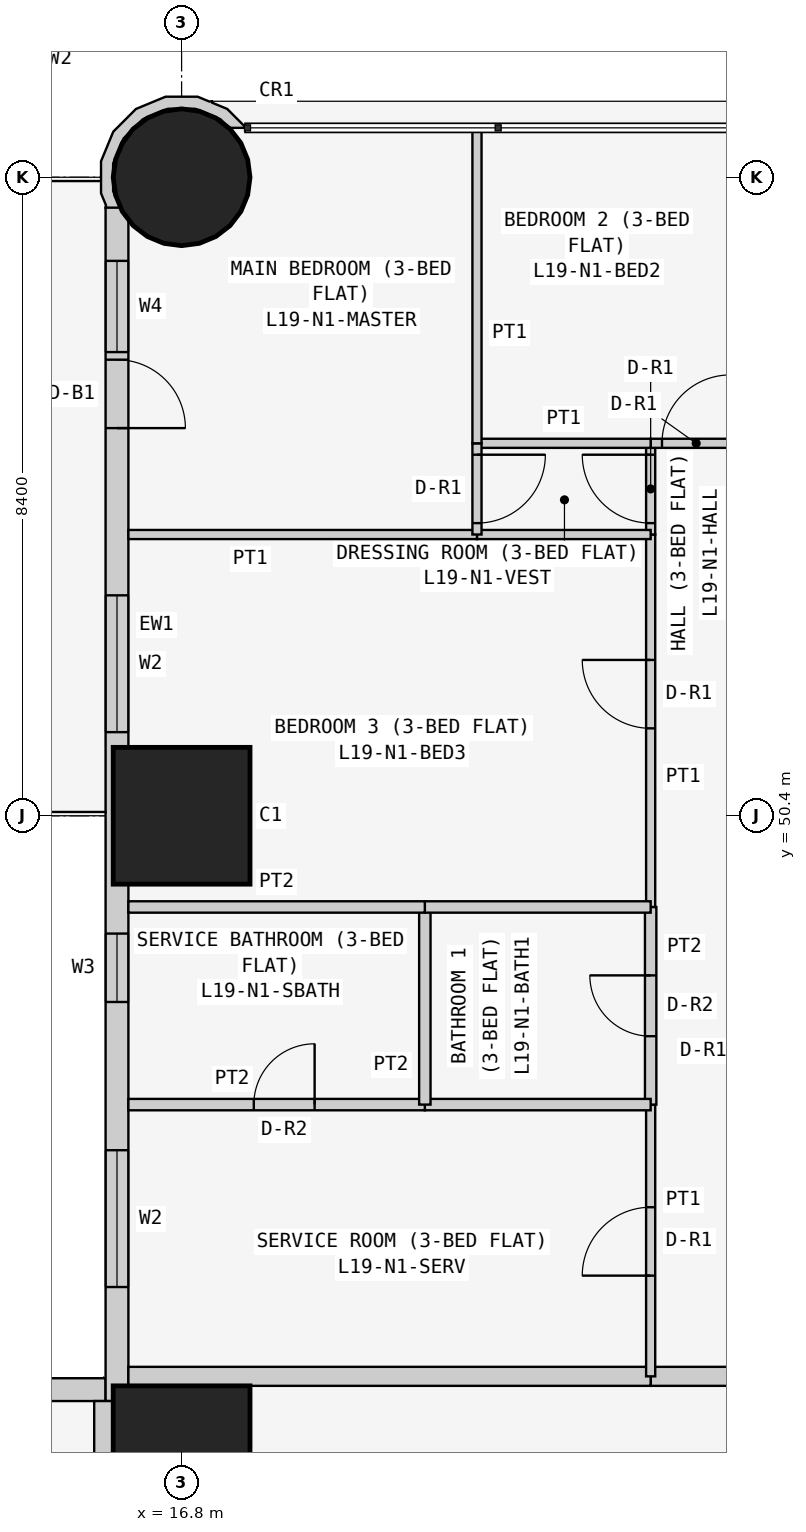
"""IFC4 building model, lengths in metres.
Left out: names, types, materials, properties, quantities, classifications, styles, units other than length and angle.
Written with IfcOpenShell. Run it as: python <this file> out.ifc"""

import sys

from ifc_helpers import new_model, si_unit, direction, frame, frame_2d, origin, origin_2d, place, context, subcontext, project, spatial, polyline, rectangle, circle, outline, extrude, element, fill, save


model = new_model("IFC4")
c1 = context("Model", 3, precision=1e-05, world=origin(), true_north=direction((0.0, 1.0)))
c2 = subcontext(c1, "Body", "Model", "MODEL_VIEW")
j1 = project(units=[si_unit("LENGTHUNIT", "METRE"), si_unit("PLANEANGLEUNIT", "RADIAN")], contexts=[c1])
p1 = place(None, origin())
s1 = spatial("IfcSite", under=j1, at=p1, CompositionType="ELEMENT")
p2 = place(p1, origin())
s2 = spatial("IfcBuilding", under=s1, at=p2, CompositionType="ELEMENT")
p3 = place(p2, frame((0.0, 0.0, 77.7)))
s3 = spatial("IfcBuildingStorey", under=s2, at=p3, CompositionType="ELEMENT", Elevation=77.7)
for number, where, z_axis, x_axis in (
    (1, (16.8, 42.0, 0.0), (0.0, 0.0, 1.0), (1.0, 0.0, 0.0)),
    (2, (16.8, 50.4, 0.0), (0.0, 0.0, 1.0), (1.0, 0.0, 0.0)),
):
    element("IfcColumn", number, at=place(p3, frame(where, z_axis=z_axis, x_axis=x_axis)), inside=s3, PredefinedType="COLUMN", context=c2, shape_type="SweptSolid", body=[
        extrude(rectangle(XDim=1.8, YDim=1.8, at=origin_2d()), origin(), (0.0, 0.0, 1.0), 3.6),
    ])
p4 = place(p3, frame((16.8, 58.8, 0.0), z_axis=(0.0, 0.0, 1.0), x_axis=(1.0, 0.0, 0.0)))
e3 = element("IfcColumn", 3, at=p4, inside=s3, PredefinedType="COLUMN", context=c2, shape_type="SweptSolid", body=[
    extrude(circle(Radius=0.9, at=origin_2d()), origin(), (0.0, 0.0, 1.0), 3.6),
])
p5 = place(p3, frame((15.8, 42.85, 0.0), z_axis=(0.0, 0.0, 1.0), x_axis=(-1.0, 0.0, 0.0)))
e4 = element("IfcWall", 4, at=p5, inside=s3, PredefinedType="SOLIDWALL", context=c2, shape_type="SweptSolid", body=[
    extrude(rectangle(XDim=15.4, YDim=0.3, at=frame_2d((7.7, 0.0))), origin(), (0.0, 0.0, 1.0), 3.45),
])
p6 = place(p5, frame((1.2, 0.0, 0.9)))
e5 = element("IfcOpeningElement", 5, at=p6, cuts=e4, PredefinedType="OPENING", context=c2, shape_type="SweptSolid", body=[
    extrude(rectangle(XDim=1.8, YDim=1.5, at=frame_2d((0.9, 0.75))), frame((0.0, 0.16, 0.0), z_axis=(0.0, -1.0, 0.0), x_axis=(1.0, 0.0, 0.0)), (0.0, 0.0, 1.0), 0.32),
])
p7 = place(p5, frame((4.95, 0.0, 1.5)))
e6 = element("IfcOpeningElement", 6, at=p7, cuts=e4, PredefinedType="OPENING", context=c2, shape_type="SweptSolid", body=[
    extrude(rectangle(XDim=0.9, YDim=0.7, at=frame_2d((0.45, 0.35))), frame((0.0, 0.16, 0.0), z_axis=(0.0, -1.0, 0.0), x_axis=(1.0, 0.0, 0.0)), (0.0, 0.0, 1.0), 0.32),
])
p8 = place(p5, frame((8.5, 0.0, 0.9)))
e7 = element("IfcOpeningElement", 7, at=p8, cuts=e4, PredefinedType="OPENING", context=c2, shape_type="SweptSolid", body=[
    extrude(rectangle(XDim=1.8, YDim=1.5, at=frame_2d((0.9, 0.75))), frame((0.0, 0.16, 0.0), z_axis=(0.0, -1.0, 0.0), x_axis=(1.0, 0.0, 0.0)), (0.0, 0.0, 1.0), 0.32),
])
p9 = place(p5, frame((12.5, 0.0, 0.0)))
e8 = element("IfcOpeningElement", 8, at=p9, cuts=e4, PredefinedType="OPENING", context=c2, shape_type="SweptSolid", body=[
    extrude(rectangle(XDim=0.9, YDim=2.4, at=frame_2d((0.45, 1.2))), frame((0.0, 0.16, 0.0), z_axis=(0.0, -1.0, 0.0), x_axis=(1.0, 0.0, 0.0)), (0.0, 0.0, 1.0), 0.32),
])
p10 = place(p5, frame((13.5, 0.0, 0.9)))
e9 = element("IfcOpeningElement", 9, at=p10, cuts=e4, PredefinedType="OPENING", context=c2, shape_type="SweptSolid", body=[
    extrude(rectangle(XDim=1.2, YDim=1.5, at=frame_2d((0.6, 0.75))), frame((0.0, 0.16, 0.0), z_axis=(0.0, -1.0, 0.0), x_axis=(1.0, 0.0, 0.0)), (0.0, 0.0, 1.0), 0.32),
])
p11 = place(p3, frame((15.95, 58.4, 0.0), z_axis=(0.0, 0.0, 1.0), x_axis=(0.0, -1.0, 0.0)))
e10 = element("IfcWall", 10, at=p11, inside=s3, PredefinedType="SOLIDWALL", context=c2, shape_type="SweptSolid", body=[
    extrude(rectangle(XDim=15.7, YDim=0.3, at=frame_2d((7.85, 0.0))), origin(), (0.0, 0.0, 1.0), 3.45),
])
p12 = place(p11, frame((12.4, 0.0, 0.9)))
e11 = element("IfcOpeningElement", 11, at=p12, cuts=e10, PredefinedType="OPENING", context=c2, shape_type="SweptSolid", body=[
    extrude(rectangle(XDim=1.8, YDim=1.5, at=frame_2d((0.9, 0.75))), frame((0.0, 0.16, 0.0), z_axis=(0.0, -1.0, 0.0), x_axis=(1.0, 0.0, 0.0)), (0.0, 0.0, 1.0), 0.32),
])
p13 = place(p11, frame((9.55, 0.0, 1.5)))
e12 = element("IfcOpeningElement", 12, at=p13, cuts=e10, PredefinedType="OPENING", context=c2, shape_type="SweptSolid", body=[
    extrude(rectangle(XDim=0.9, YDim=0.7, at=frame_2d((0.45, 0.35))), frame((0.0, 0.16, 0.0), z_axis=(0.0, -1.0, 0.0), x_axis=(1.0, 0.0, 0.0)), (0.0, 0.0, 1.0), 0.32),
])
p14 = place(p11, frame((5.1, 0.0, 0.9)))
e13 = element("IfcOpeningElement", 13, at=p14, cuts=e10, PredefinedType="OPENING", context=c2, shape_type="SweptSolid", body=[
    extrude(rectangle(XDim=1.8, YDim=1.5, at=frame_2d((0.9, 0.75))), frame((0.0, 0.16, 0.0), z_axis=(0.0, -1.0, 0.0), x_axis=(1.0, 0.0, 0.0)), (0.0, 0.0, 1.0), 0.32),
])
p15 = place(p11, frame((2.0, 0.0, 0.0)))
e14 = element("IfcOpeningElement", 14, at=p15, cuts=e10, PredefinedType="OPENING", context=c2, shape_type="SweptSolid", body=[
    extrude(rectangle(XDim=0.9, YDim=2.4, at=frame_2d((0.45, 1.2))), frame((0.0, 0.16, 0.0), z_axis=(0.0, -1.0, 0.0), x_axis=(1.0, 0.0, 0.0)), (0.0, 0.0, 1.0), 0.32),
])
p16 = place(p11, frame((0.7, 0.0, 0.9)))
e15 = element("IfcOpeningElement", 15, at=p16, cuts=e10, PredefinedType="OPENING", context=c2, shape_type="SweptSolid", body=[
    extrude(rectangle(XDim=1.2, YDim=1.5, at=frame_2d((0.6, 0.75))), frame((0.0, 0.16, 0.0), z_axis=(0.0, -1.0, 0.0), x_axis=(1.0, 0.0, 0.0)), (0.0, 0.0, 1.0), 0.32),
])
p17 = place(p3, frame((17.567, 59.411, 0.0), z_axis=(0.0, 0.0, 1.0), x_axis=(-0.377204953059, 0.926129809145, 0.0)))
e16 = element("IfcWall", 16, at=p17, inside=s3, PredefinedType="SOLIDWALL", context=c2, shape_type="SweptSolid", body=[
    extrude(outline(polyline([(-0.27, 2.017), (-0.37, 1.841), (-0.102, 1.842), (0.23, 1.707), (0.484, 1.455), (0.624, 1.125), (0.626, 0.766), (0.491, 0.434), (0.239, 0.18), (0.09, 0.117), (0.011, -0.078), (0.024, -0.083), (0.329, 0.045), (0.48, 0.198), (0.499, 0.193), (0.508, 0.225), (0.626, 0.345), (0.785, 0.736), (0.782, 1.157), (0.619, 1.546), (0.319, 1.842), (-0.072, 2.002), (-0.24, 2.0), (-0.27, 2.017)])), origin(), (0.0, 0.0, 1.0), 3.45),
])
p18 = place(p3, frame((22.971, 43.025, 0.0), z_axis=(0.0, 0.0, 1.0), x_axis=(1.0, 0.0, 0.0)))
e17 = element("IfcWall", 17, at=p18, inside=s3, PredefinedType="PARTITIONING", context=c2, shape_type="SweptSolid", body=[
    extrude(rectangle(XDim=1.2, YDim=0.25, at=frame_2d((0.6, 0.0))), origin(), (0.0, 0.0, 1.0), 3.45),
])
p19 = place(p3, frame((16.1, 43.025, 0.0), z_axis=(0.0, 0.0, 1.0), x_axis=(1.0, 0.0, 0.0)))
e18 = element("IfcWall", 18, at=p19, inside=s3, PredefinedType="PARTITIONING", context=c2, shape_type="SweptSolid", body=[
    extrude(rectangle(XDim=6.871, YDim=0.25, at=frame_2d((3.436, 0.0))), origin(), (0.0, 0.0, 1.0), 3.45),
])
p20 = place(p3, frame((15.775, 36.229, 0.0), z_axis=(0.0, 0.0, 1.0), x_axis=(0.0, 1.0, 0.0)))
e19 = element("IfcWall", 19, at=p20, inside=s3, PredefinedType="PARTITIONING", context=c2, shape_type="SweptSolid", body=[
    extrude(rectangle(XDim=6.471, YDim=0.25, at=frame_2d((3.235, 0.0))), origin(), (0.0, 0.0, 1.0), 3.45),
])
p21 = place(p3, frame((22.971, 46.6, 0.0), z_axis=(0.0, 0.0, 1.0), x_axis=(0.0, -1.0, 0.0)))
e20 = element("IfcWall", 20, at=p21, inside=s3, PredefinedType="PARTITIONING", context=c2, shape_type="SweptSolid", body=[
    extrude(rectangle(XDim=3.575, YDim=0.12, at=frame_2d((1.788, 0.0))), origin(), (0.0, 0.0, 1.0), 3.45),
])
p22 = place(p21, frame((1.35, 0.0, 0.0)))
e21 = element("IfcOpeningElement", 21, at=p22, cuts=e20, PredefinedType="OPENING", context=c2, shape_type="SweptSolid", body=[
    extrude(rectangle(XDim=0.9, YDim=2.1, at=frame_2d((0.45, 1.05))), frame((0.0, 0.07, 0.0), z_axis=(0.0, -1.0, 0.0), x_axis=(1.0, 0.0, 0.0)), (0.0, 0.0, 1.0), 0.14),
])
p23 = place(p3, frame((22.971, 49.2, 0.0), z_axis=(0.0, 0.0, 1.0), x_axis=(0.0, -1.0, 0.0)))
e22 = element("IfcWall", 22, at=p23, inside=s3, PredefinedType="PARTITIONING", context=c2, shape_type="SweptSolid", body=[
    extrude(rectangle(XDim=2.6, YDim=0.15, at=frame_2d((1.3, 0.0))), origin(), (0.0, 0.0, 1.0), 3.45),
])
p24 = place(p23, frame((0.9, 0.0, 0.0)))
e23 = element("IfcOpeningElement", 23, at=p24, cuts=e22, PredefinedType="OPENING", context=c2, shape_type="SweptSolid", body=[
    extrude(rectangle(XDim=0.8, YDim=2.1, at=frame_2d((0.4, 1.05))), frame((0.0, 0.085, 0.0), z_axis=(0.0, -1.0, 0.0), x_axis=(1.0, 0.0, 0.0)), (0.0, 0.0, 1.0), 0.17),
])
p25 = place(p3, frame((22.971, 54.1, 0.0), z_axis=(0.0, 0.0, 1.0), x_axis=(0.0, -1.0, 0.0)))
e24 = element("IfcWall", 24, at=p25, inside=s3, PredefinedType="PARTITIONING", context=c2, shape_type="SweptSolid", body=[
    extrude(rectangle(XDim=4.9, YDim=0.12, at=frame_2d((2.45, 0.0))), origin(), (0.0, 0.0, 1.0), 3.45),
])
p26 = place(p25, frame((1.65, 0.0, 0.0)))
e25 = element("IfcOpeningElement", 25, at=p26, cuts=e24, PredefinedType="OPENING", context=c2, shape_type="SweptSolid", body=[
    extrude(rectangle(XDim=0.9, YDim=2.1, at=frame_2d((0.45, 1.05))), frame((0.0, 0.07, 0.0), z_axis=(0.0, -1.0, 0.0), x_axis=(1.0, 0.0, 0.0)), (0.0, 0.0, 1.0), 0.14),
])
p27 = place(p3, frame((22.971, 55.3, 0.0), z_axis=(0.0, 0.0, 1.0), x_axis=(0.0, -1.0, 0.0)))
e26 = element("IfcWall", 26, at=p27, inside=s3, PredefinedType="PARTITIONING", context=c2, shape_type="SweptSolid", body=[
    extrude(rectangle(XDim=1.2, YDim=0.12, at=frame_2d((0.6, 0.0))), origin(), (0.0, 0.0, 1.0), 3.45),
])
p28 = place(p27, frame((0.15, 0.0, 0.0)))
e27 = element("IfcOpeningElement", 27, at=p28, cuts=e26, PredefinedType="OPENING", context=c2, shape_type="SweptSolid", body=[
    extrude(rectangle(XDim=0.9, YDim=2.1, at=frame_2d((0.45, 1.05))), frame((0.0, 0.07, 0.0), z_axis=(0.0, -1.0, 0.0), x_axis=(1.0, 0.0, 0.0)), (0.0, 0.0, 1.0), 0.14),
])
p29 = place(p3, frame((24.171, 55.3, 0.0), z_axis=(0.0, 0.0, 1.0), x_axis=(-1.0, 0.0, 0.0)))
e28 = element("IfcWall", 28, at=p29, inside=s3, PredefinedType="PARTITIONING", context=c2, shape_type="SweptSolid", body=[
    extrude(rectangle(XDim=1.2, YDim=0.12, at=frame_2d((0.6, 0.0))), origin(), (0.0, 0.0, 1.0), 3.45),
])
p30 = place(p29, frame((0.151, 0.0, 0.0)))
e29 = element("IfcOpeningElement", 29, at=p30, cuts=e28, PredefinedType="OPENING", context=c2, shape_type="SweptSolid", body=[
    extrude(rectangle(XDim=0.9, YDim=2.1, at=frame_2d((0.45, 1.05))), frame((0.0, 0.07, 0.0), z_axis=(0.0, -1.0, 0.0), x_axis=(1.0, 0.0, 0.0)), (0.0, 0.0, 1.0), 0.14),
])
p31 = place(p3, frame((22.971, 46.6, 0.0), z_axis=(0.0, 0.0, 1.0), x_axis=(-1.0, 0.0, 0.0)))
e30 = element("IfcWall", 30, at=p31, inside=s3, PredefinedType="PARTITIONING", context=c2, shape_type="SweptSolid", body=[
    extrude(rectangle(XDim=2.971, YDim=0.15, at=frame_2d((1.485, 0.0))), origin(), (0.0, 0.0, 1.0), 3.45),
])
p32 = place(p3, frame((20.0, 46.6, 0.0), z_axis=(0.0, 0.0, 1.0), x_axis=(-1.0, 0.0, 0.0)))
e31 = element("IfcWall", 31, at=p32, inside=s3, PredefinedType="PARTITIONING", context=c2, shape_type="SweptSolid", body=[
    extrude(rectangle(XDim=3.9, YDim=0.15, at=frame_2d((1.95, 0.0))), origin(), (0.0, 0.0, 1.0), 3.45),
])
p33 = place(p32, frame((1.45, 0.0, 0.0)))
e32 = element("IfcOpeningElement", 32, at=p33, cuts=e31, PredefinedType="OPENING", context=c2, shape_type="SweptSolid", body=[
    extrude(rectangle(XDim=0.8, YDim=2.1, at=frame_2d((0.4, 1.05))), frame((0.0, 0.085, 0.0), z_axis=(0.0, -1.0, 0.0), x_axis=(1.0, 0.0, 0.0)), (0.0, 0.0, 1.0), 0.17),
])
p34 = place(p3, frame((20.0, 49.2, 0.0), z_axis=(0.0, 0.0, 1.0), x_axis=(0.0, -1.0, 0.0)))
e33 = element("IfcWall", 33, at=p34, inside=s3, PredefinedType="PARTITIONING", context=c2, shape_type="SweptSolid", body=[
    extrude(rectangle(XDim=2.6, YDim=0.15, at=frame_2d((1.3, 0.0))), origin(), (0.0, 0.0, 1.0), 3.45),
])
p35 = place(p3, frame((22.971, 49.2, 0.0), z_axis=(0.0, 0.0, 1.0), x_axis=(-1.0, 0.0, 0.0)))
e34 = element("IfcWall", 34, at=p35, inside=s3, PredefinedType="PARTITIONING", context=c2, shape_type="SweptSolid", body=[
    extrude(rectangle(XDim=2.971, YDim=0.15, at=frame_2d((1.485, 0.0))), origin(), (0.0, 0.0, 1.0), 3.45),
])
p36 = place(p3, frame((20.0, 49.2, 0.0), z_axis=(0.0, 0.0, 1.0), x_axis=(-1.0, 0.0, 0.0)))
e35 = element("IfcWall", 35, at=p36, inside=s3, PredefinedType="PARTITIONING", context=c2, shape_type="SweptSolid", body=[
    extrude(rectangle(XDim=3.9, YDim=0.15, at=frame_2d((1.95, 0.0))), origin(), (0.0, 0.0, 1.0), 3.45),
])
p37 = place(p3, frame((22.971, 54.1, 0.0), z_axis=(0.0, 0.0, 1.0), x_axis=(-1.0, 0.0, 0.0)))
e36 = element("IfcWall", 36, at=p37, inside=s3, PredefinedType="PARTITIONING", context=c2, shape_type="SweptSolid", body=[
    extrude(rectangle(XDim=2.285, YDim=0.12, at=frame_2d((1.143, 0.0))), origin(), (0.0, 0.0, 1.0), 3.45),
])
p38 = place(p3, frame((20.686, 54.1, 0.0), z_axis=(0.0, 0.0, 1.0), x_axis=(-1.0, 0.0, 0.0)))
e37 = element("IfcWall", 37, at=p38, inside=s3, PredefinedType="PARTITIONING", context=c2, shape_type="SweptSolid", body=[
    extrude(rectangle(XDim=4.586, YDim=0.12, at=frame_2d((2.293, 0.0))), origin(), (0.0, 0.0, 1.0), 3.45),
])
p39 = place(p3, frame((22.971, 55.3, 0.0), z_axis=(0.0, 0.0, 1.0), x_axis=(-1.0, 0.0, 0.0)))
e38 = element("IfcWall", 38, at=p39, inside=s3, PredefinedType="PARTITIONING", context=c2, shape_type="SweptSolid", body=[
    extrude(rectangle(XDim=2.285, YDim=0.12, at=frame_2d((1.143, 0.0))), origin(), (0.0, 0.0, 1.0), 3.45),
])
p40 = place(p3, frame((20.686, 55.3, 0.0), z_axis=(0.0, 0.0, 1.0), x_axis=(0.0, -1.0, 0.0)))
e39 = element("IfcWall", 39, at=p40, inside=s3, PredefinedType="PARTITIONING", context=c2, shape_type="SweptSolid", body=[
    extrude(rectangle(XDim=1.2, YDim=0.12, at=frame_2d((0.6, 0.0))), origin(), (0.0, 0.0, 1.0), 3.45),
])
p41 = place(p40, frame((0.15, 0.0, 0.0)))
e40 = element("IfcOpeningElement", 40, at=p41, cuts=e39, PredefinedType="OPENING", context=c2, shape_type="SweptSolid", body=[
    extrude(rectangle(XDim=0.9, YDim=2.1, at=frame_2d((0.45, 1.05))), frame((0.0, 0.07, 0.0), z_axis=(0.0, -1.0, 0.0), x_axis=(1.0, 0.0, 0.0)), (0.0, 0.0, 1.0), 0.14),
])
p42 = place(p3, frame((20.686, 59.45, 0.0), z_axis=(0.0, 0.0, 1.0), x_axis=(0.0, -1.0, 0.0)))
e41 = element("IfcWall", 41, at=p42, inside=s3, PredefinedType="PARTITIONING", context=c2, shape_type="SweptSolid", body=[
    extrude(rectangle(XDim=4.15, YDim=0.12, at=frame_2d((2.075, 0.0))), origin(), (0.0, 0.0, 1.0), 3.45),
])
p43 = place(p12, origin())
e42 = element("IfcWindow", 42, at=p43, inside=s3, PartitioningType="SINGLE_PANEL", PredefinedType="WINDOW", context=c2, shape_type="SweptSolid", body=[
    extrude(rectangle(XDim=1.8, YDim=1.5, at=frame_2d((0.9, 0.75))), frame((0.0, 0.03, 0.0), z_axis=(0.0, -1.0, 0.0), x_axis=(1.0, 0.0, 0.0)), (0.0, 0.0, 1.0), 0.06),
])
fill(e11, e42)
p44 = place(p13, origin())
e43 = element("IfcWindow", 43, at=p44, inside=s3, PartitioningType="SINGLE_PANEL", PredefinedType="WINDOW", context=c2, shape_type="SweptSolid", body=[
    extrude(rectangle(XDim=0.9, YDim=0.7, at=frame_2d((0.45, 0.35))), frame((0.0, 0.03, 0.0), z_axis=(0.0, -1.0, 0.0), x_axis=(1.0, 0.0, 0.0)), (0.0, 0.0, 1.0), 0.06),
])
fill(e12, e43)
p45 = place(p14, origin())
e44 = element("IfcWindow", 44, at=p45, inside=s3, PartitioningType="SINGLE_PANEL", PredefinedType="WINDOW", context=c2, shape_type="SweptSolid", body=[
    extrude(rectangle(XDim=1.8, YDim=1.5, at=frame_2d((0.9, 0.75))), frame((0.0, 0.03, 0.0), z_axis=(0.0, -1.0, 0.0), x_axis=(1.0, 0.0, 0.0)), (0.0, 0.0, 1.0), 0.06),
])
fill(e13, e44)
p46 = place(p15, origin())
e45 = element("IfcDoor", 45, at=p46, inside=s3, OperationType="SINGLE_SWING_RIGHT", PredefinedType="DOOR", context=c2, shape_type="SweptSolid", body=[
    extrude(rectangle(XDim=0.9, YDim=2.4, at=frame_2d((0.45, 1.2))), frame((0.0, 0.025, 0.0), z_axis=(0.0, -1.0, 0.0), x_axis=(1.0, 0.0, 0.0)), (0.0, 0.0, 1.0), 0.05),
])
fill(e14, e45)
p47 = place(p16, origin())
e46 = element("IfcWindow", 46, at=p47, inside=s3, PartitioningType="SINGLE_PANEL", PredefinedType="WINDOW", context=c2, shape_type="SweptSolid", body=[
    extrude(rectangle(XDim=1.2, YDim=1.5, at=frame_2d((0.6, 0.75))), frame((0.0, 0.03, 0.0), z_axis=(0.0, -1.0, 0.0), x_axis=(1.0, 0.0, 0.0)), (0.0, 0.0, 1.0), 0.06),
])
fill(e15, e46)
p48 = place(p22, frame((0.9, 0.0, 0.0), z_axis=(0.0, 0.0, 1.0), x_axis=(-1.0, 0.0, 0.0)))
e47 = element("IfcDoor", 47, at=p48, inside=s3, OperationType="SINGLE_SWING_LEFT", PredefinedType="DOOR", context=c2, shape_type="SweptSolid", body=[
    extrude(rectangle(XDim=0.9, YDim=2.1, at=frame_2d((0.45, 1.05))), frame((0.0, 0.025, 0.0), z_axis=(0.0, -1.0, 0.0), x_axis=(1.0, 0.0, 0.0)), (0.0, 0.0, 1.0), 0.05),
])
fill(e21, e47)
p49 = place(p33, frame((0.8, 0.0, 0.0), z_axis=(0.0, 0.0, 1.0), x_axis=(-1.0, 0.0, 0.0)))
e48 = element("IfcDoor", 48, at=p49, inside=s3, OperationType="SINGLE_SWING_RIGHT", PredefinedType="DOOR", context=c2, shape_type="SweptSolid", body=[
    extrude(rectangle(XDim=0.8, YDim=2.1, at=frame_2d((0.4, 1.05))), frame((0.0, 0.025, 0.0), z_axis=(0.0, -1.0, 0.0), x_axis=(1.0, 0.0, 0.0)), (0.0, 0.0, 1.0), 0.05),
])
fill(e32, e48)
p50 = place(p24, frame((0.8, 0.0, 0.0), z_axis=(0.0, 0.0, 1.0), x_axis=(-1.0, 0.0, 0.0)))
e49 = element("IfcDoor", 49, at=p50, inside=s3, OperationType="SINGLE_SWING_RIGHT", PredefinedType="DOOR", context=c2, shape_type="SweptSolid", body=[
    extrude(rectangle(XDim=0.8, YDim=2.1, at=frame_2d((0.4, 1.05))), frame((0.0, 0.025, 0.0), z_axis=(0.0, -1.0, 0.0), x_axis=(1.0, 0.0, 0.0)), (0.0, 0.0, 1.0), 0.05),
])
fill(e23, e49)
p51 = place(p26, frame((0.9, 0.0, 0.0), z_axis=(0.0, 0.0, 1.0), x_axis=(-1.0, 0.0, 0.0)))
e50 = element("IfcDoor", 50, at=p51, inside=s3, OperationType="SINGLE_SWING_RIGHT", PredefinedType="DOOR", context=c2, shape_type="SweptSolid", body=[
    extrude(rectangle(XDim=0.9, YDim=2.1, at=frame_2d((0.45, 1.05))), frame((0.0, 0.025, 0.0), z_axis=(0.0, -1.0, 0.0), x_axis=(1.0, 0.0, 0.0)), (0.0, 0.0, 1.0), 0.05),
])
fill(e25, e50)
p52 = place(p28, frame((0.9, 0.0, 0.0), z_axis=(0.0, 0.0, 1.0), x_axis=(-1.0, 0.0, 0.0)))
e51 = element("IfcDoor", 51, at=p52, inside=s3, OperationType="SINGLE_SWING_RIGHT", PredefinedType="DOOR", context=c2, shape_type="SweptSolid", body=[
    extrude(rectangle(XDim=0.9, YDim=2.1, at=frame_2d((0.45, 1.05))), frame((0.0, 0.025, 0.0), z_axis=(0.0, -1.0, 0.0), x_axis=(1.0, 0.0, 0.0)), (0.0, 0.0, 1.0), 0.05),
])
fill(e27, e51)
p53 = place(p41, origin())
e52 = element("IfcDoor", 52, at=p53, inside=s3, OperationType="SINGLE_SWING_LEFT", PredefinedType="DOOR", context=c2, shape_type="SweptSolid", body=[
    extrude(rectangle(XDim=0.9, YDim=2.1, at=frame_2d((0.45, 1.05))), frame((0.0, 0.025, 0.0), z_axis=(0.0, -1.0, 0.0), x_axis=(1.0, 0.0, 0.0)), (0.0, 0.0, 1.0), 0.05),
])
fill(e40, e52)
p54 = place(p30, frame((0.9, 0.0, 0.0), z_axis=(0.0, 0.0, 1.0), x_axis=(-1.0, 0.0, 0.0)))
e53 = element("IfcDoor", 53, at=p54, inside=s3, OperationType="SINGLE_SWING_RIGHT", PredefinedType="DOOR", context=c2, shape_type="SweptSolid", body=[
    extrude(rectangle(XDim=0.9, YDim=2.1, at=frame_2d((0.45, 1.05))), frame((0.0, 0.025, 0.0), z_axis=(0.0, -1.0, 0.0), x_axis=(1.0, 0.0, 0.0)), (0.0, 0.0, 1.0), 0.05),
])
fill(e29, e53)
save(model, sys.argv[1])
